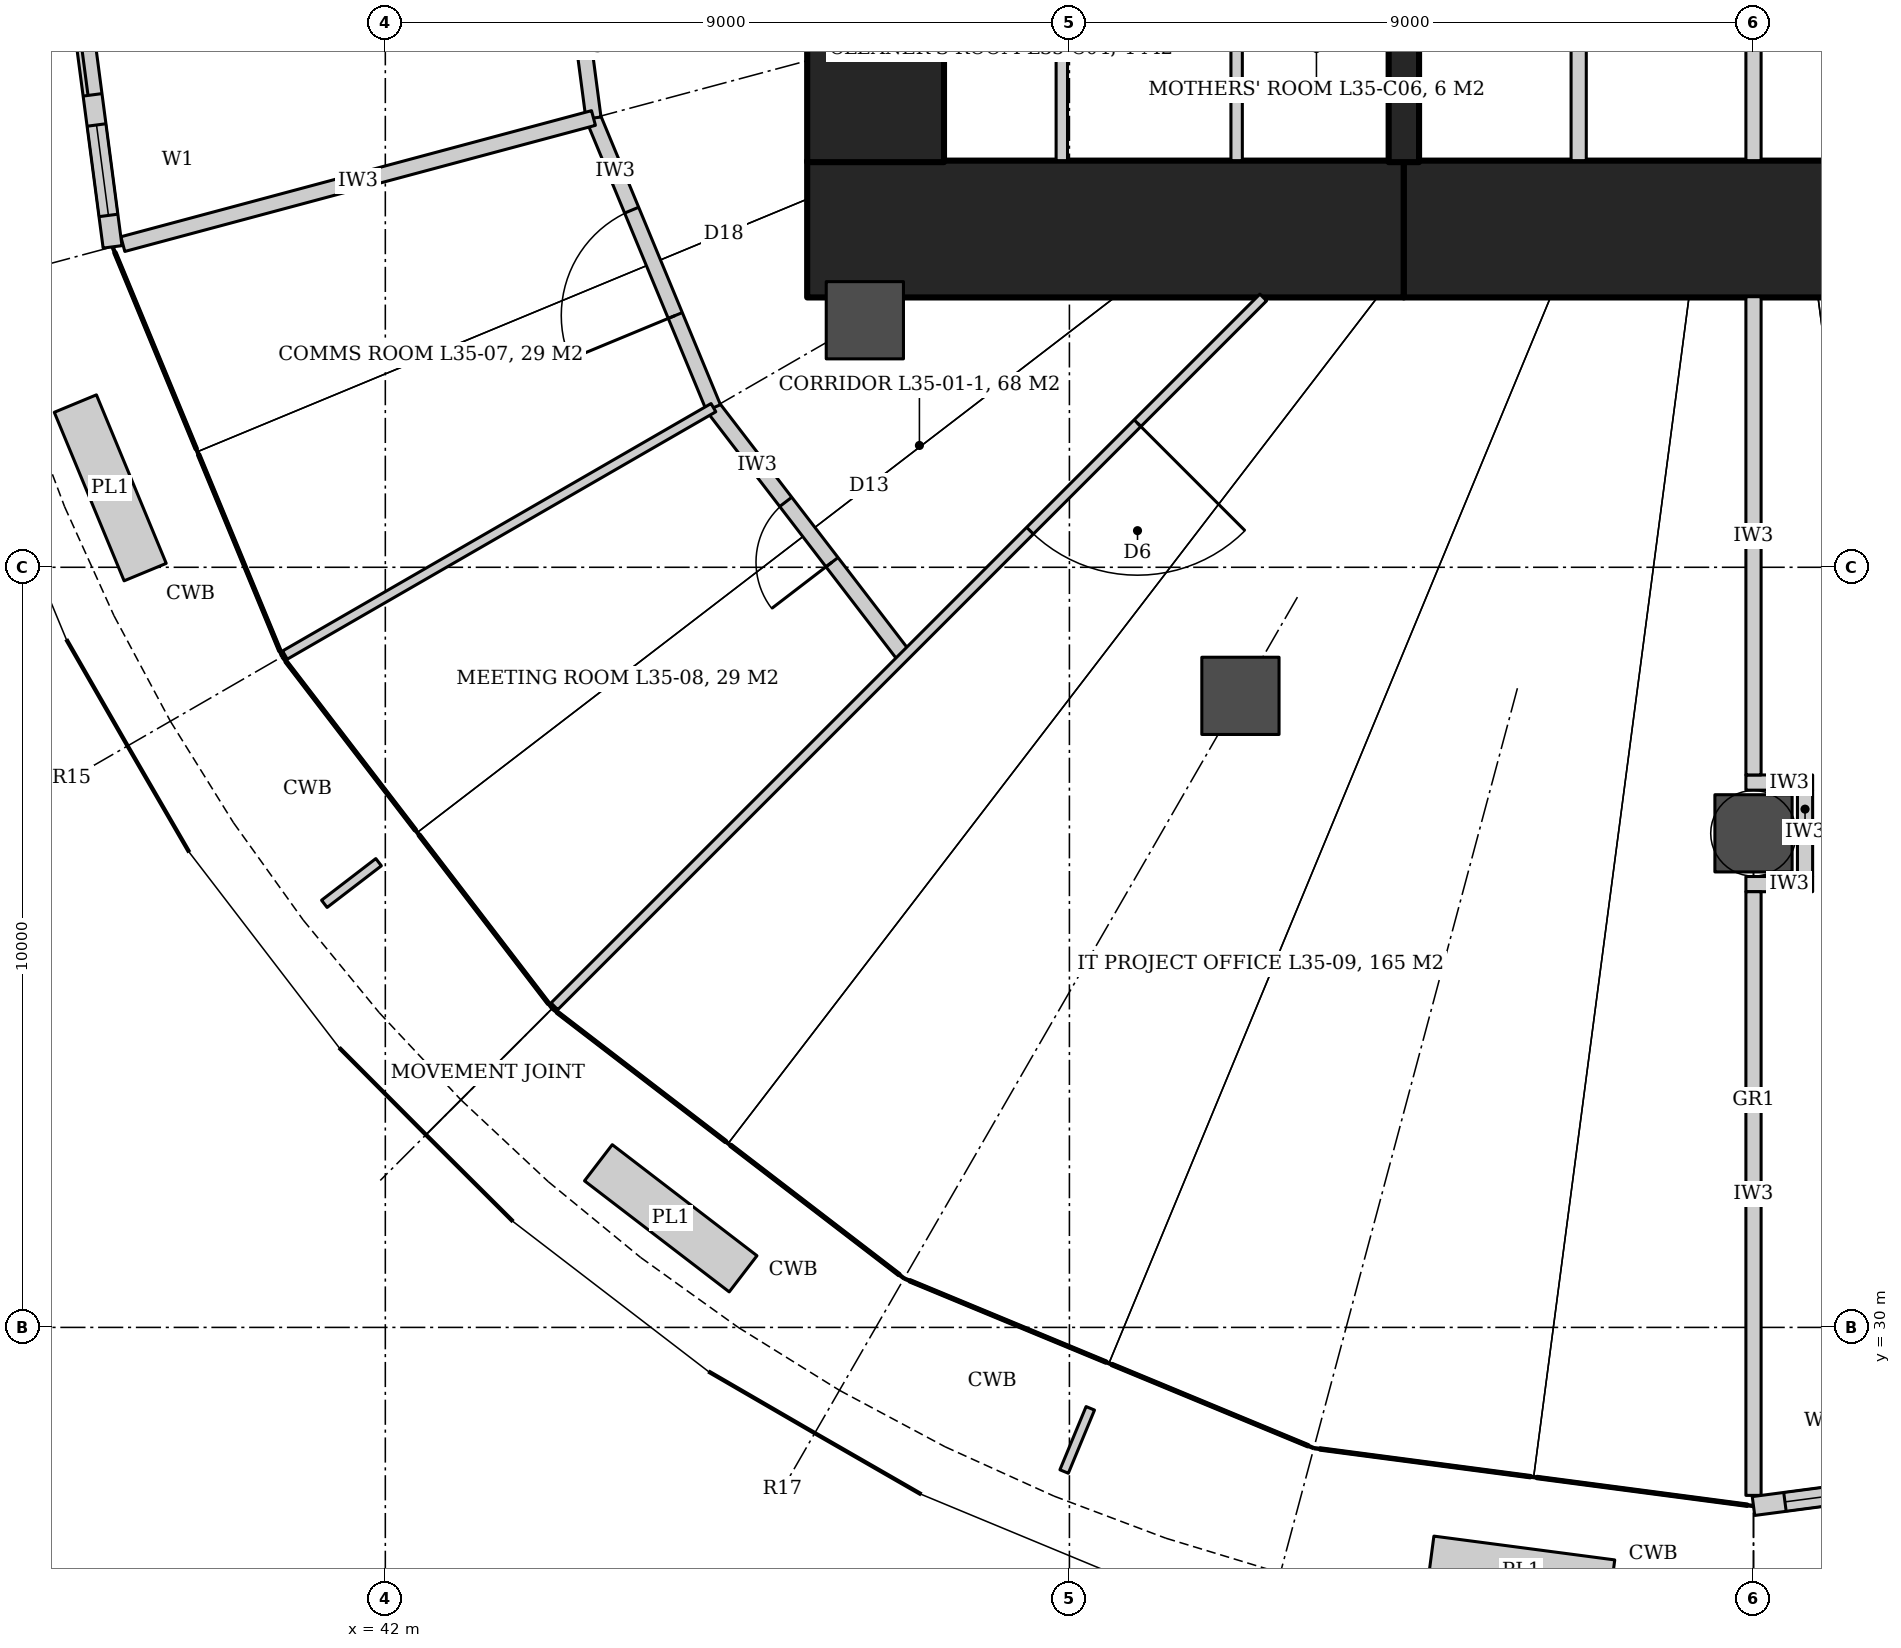
"""IFC4 building model, lengths in metres.
Left out: names, types, materials, properties, quantities, classifications, styles, units other than length and angle.
Written with IfcOpenShell. Run it as: python <this file> out.ifc"""

import sys

from ifc_helpers import new_model, si_unit, direction, frame, frame_2d, origin, origin_2d, place, context, subcontext, project, spatial, rectangle, hollow_circle, extrude, element, fill, save


model = new_model("IFC4")
c1 = context("Model", 3, precision=1e-05, world=origin(), true_north=direction((0.0, 1.0)))
c2 = subcontext(c1, "Body", "Model", "MODEL_VIEW")
j1 = project(units=[si_unit("LENGTHUNIT", "METRE"), si_unit("PLANEANGLEUNIT", "RADIAN")], contexts=[c1])
p1 = place(None, origin())
s1 = spatial("IfcSite", under=j1, at=p1, CompositionType="ELEMENT")
p2 = place(p1, origin())
s2 = spatial("IfcBuilding", under=s1, at=p2, CompositionType="ELEMENT")
p3 = place(p2, frame((0.0, 0.0, 147.8)))
s3 = spatial("IfcBuildingStorey", under=s2, at=p3, CompositionType="ELEMENT", Elevation=147.8)
p4 = place(p3, frame((47.55, 44.45, 0.0), z_axis=(0.0, 0.0, 1.0), x_axis=(1.0, 0.0, 0.0)))
e1 = element("IfcWall", 1, at=p4, inside=s3, PredefinedType="SHEAR", context=c2, shape_type="SweptSolid", body=[
    extrude(rectangle(XDim=7.85, YDim=1.8, at=frame_2d((3.925, 0.0))), origin(), (0.0, 0.0, 1.0), 4.2),
])
p5 = place(p3, frame((55.4, 44.45, 0.0), z_axis=(0.0, 0.0, 1.0), x_axis=(1.0, 0.0, 0.0)))
e2 = element("IfcWall", 2, at=p5, inside=s3, PredefinedType="SHEAR", context=c2, shape_type="SweptSolid", body=[
    extrude(rectangle(XDim=9.2, YDim=1.8, at=frame_2d((4.6, 0.0))), origin(), (0.0, 0.0, 1.0), 4.2),
])
p6 = place(p3, frame((48.45, 45.33, 0.0), z_axis=(0.0, 0.0, 1.0), x_axis=(0.0, 1.0, 0.0)))
e3 = element("IfcWall", 3, at=p6, inside=s3, PredefinedType="SHEAR", context=c2, shape_type="SweptSolid", body=[
    extrude(rectangle(XDim=3.17, YDim=1.8, at=frame_2d((1.585, 0.0))), origin(), (0.0, 0.0, 1.0), 4.2),
])
p7 = place(p3, frame((55.4, 48.32, 0.0), z_axis=(0.0, 0.0, 1.0), x_axis=(0.0, -1.0, 0.0)))
e4 = element("IfcWall", 4, at=p7, inside=s3, PredefinedType="SHEAR", context=c2, shape_type="SweptSolid", body=[
    extrude(rectangle(XDim=2.99, YDim=0.4, at=frame_2d((1.495, 0.0))), origin(), (0.0, 0.0, 1.0), 4.2),
])
for number, where, z_axis, x_axis in (
    (5, (48.309, 43.25, 0.0), (0.0, 0.0, 1.0), (1.0, 0.0, 0.0)),
    (6, (53.25, 38.309, 0.0), (0.0, 0.0, 1.0), (1.0, 0.0, 0.0)),
    (7, (60.0, 36.5, 0.0), (0.0, 0.0, 1.0), (1.0, 0.0, 0.0)),
):
    element("IfcColumn", number, at=place(p3, frame(where, z_axis=z_axis, x_axis=x_axis)), inside=s3, PredefinedType="COLUMN", context=c2, shape_type="SweptSolid", body=[
        extrude(hollow_circle(Radius=0.508, WallThickness=0.05, at=origin_2d()), origin(), (0.0, 0.0, 1.0), 4.2),
    ])
p8 = place(p3, frame((48.828, 38.828, 0.0), z_axis=(0.0, 0.0, 1.0), x_axis=(-0.608714823874, 0.793389099494, 0.0)))
e8 = element("IfcWall", 8, at=p8, inside=s3, PredefinedType="PARTITIONING", context=c2, shape_type="SweptSolid", body=[
    extrude(rectangle(XDim=4.125, YDim=0.2, at=frame_2d((2.062, 0.0))), origin(), (0.0, 0.0, 1.0), 3.04),
])
p9 = place(p8, frame((1.562, 0.0, 0.0)))
e9 = element("IfcOpeningElement", 9, at=p9, cuts=e8, PredefinedType="OPENING", context=c2, shape_type="SweptSolid", body=[
    extrude(rectangle(XDim=1.0, YDim=2.4, at=frame_2d((0.5, 1.2))), frame((0.0, 0.11, 0.0), z_axis=(0.0, -1.0, 0.0), x_axis=(1.0, 0.0, 0.0)), (0.0, 0.0, 1.0), 0.22),
])
p10 = place(p3, frame((46.317, 42.1, 0.0), z_axis=(0.0, 0.0, 1.0), x_axis=(-0.382731667114, 0.923859551549, 0.0)))
e10 = element("IfcWall", 10, at=p10, inside=s3, PredefinedType="PARTITIONING", context=c2, shape_type="SweptSolid", body=[
    extrude(rectangle(XDim=4.125, YDim=0.2, at=frame_2d((2.062, 0.0))), origin(), (0.0, 0.0, 1.0), 3.04),
])
p11 = place(p10, frame((1.312, 0.0, 0.0)))
e11 = element("IfcOpeningElement", 11, at=p11, cuts=e10, PredefinedType="OPENING", context=c2, shape_type="SweptSolid", body=[
    extrude(rectangle(XDim=1.5, YDim=2.1, at=frame_2d((0.75, 1.05))), frame((0.0, 0.11, 0.0), z_axis=(0.0, -1.0, 0.0), x_axis=(1.0, 0.0, 0.0)), (0.0, 0.0, 1.0), 0.22),
])
p12 = place(p3, frame((44.738, 45.911, 0.0), z_axis=(0.0, 0.0, 1.0), x_axis=(-0.130515758099, 0.991446234996, 0.0)))
e12 = element("IfcWall", 12, at=p12, inside=s3, PredefinedType="PARTITIONING", context=c2, shape_type="SweptSolid", body=[
    extrude(rectangle(XDim=4.125, YDim=0.2, at=frame_2d((2.062, 0.0))), origin(), (0.0, 0.0, 1.0), 3.04),
])
p13 = place(p12, frame((1.562, 0.0, 0.0)))
e13 = element("IfcOpeningElement", 13, at=p13, cuts=e12, PredefinedType="OPENING", context=c2, shape_type="SweptSolid", body=[
    extrude(rectangle(XDim=1.0, YDim=2.1, at=frame_2d((0.5, 1.05))), frame((0.0, 0.11, 0.0), z_axis=(0.0, -1.0, 0.0), x_axis=(1.0, 0.0, 0.0)), (0.0, 0.0, 1.0), 0.22),
])
p14 = place(p3, frame((44.738, 45.911, 0.0), z_axis=(0.0, 0.0, 1.0), x_axis=(-0.965919257384, -0.258843559344, 0.0)))
e14 = element("IfcWall", 14, at=p14, inside=s3, PredefinedType="PARTITIONING", context=c2, shape_type="SweptSolid", body=[
    extrude(rectangle(XDim=6.51, YDim=0.2, at=frame_2d((3.255, 0.0))), origin(), (0.0, 0.0, 1.0), 3.04),
])
p15 = place(p3, frame((46.317, 42.1, 0.0), z_axis=(0.0, 0.0, 1.0), x_axis=(-0.866020751647, -0.500008057651, 0.0)))
e15 = element("IfcWall", 15, at=p15, inside=s3, PredefinedType="PARTITIONING", context=c2, shape_type="SweptSolid", body=[
    extrude(rectangle(XDim=6.61, YDim=0.125, at=frame_2d((3.305, 0.0))), origin(), (0.0, 0.0, 1.0), 3.04),
])
p16 = place(p3, frame((53.55, 43.55, 0.0), z_axis=(0.0, 0.0, 1.0), x_axis=(-0.707106781187, -0.707106781187, 0.0)))
e16 = element("IfcWall", 16, at=p16, inside=s3, PredefinedType="PARTITIONING", context=c2, shape_type="SweptSolid", body=[
    extrude(rectangle(XDim=13.288, YDim=0.125, at=frame_2d((6.644, 0.0))), origin(), (0.0, 0.0, 1.0), 3.02),
])
p17 = place(p16, frame((2.339, 0.0, 0.0)))
e17 = element("IfcOpeningElement", 17, at=p17, cuts=e16, PredefinedType="OPENING", context=c2, shape_type="SweptSolid", body=[
    extrude(rectangle(XDim=2.0, YDim=2.1, at=frame_2d((1.0, 1.05))), frame((0.0, 0.073, 0.0), z_axis=(0.0, -1.0, 0.0), x_axis=(1.0, 0.0, 0.0)), (0.0, 0.0, 1.0), 0.145),
])
for number, where, z_axis, x_axis in (
    (18, (59.9, 37.168, 0.0), (0.0, 0.0, 1.0), (1.0, 0.0, 0.0)),
    (19, (59.9, 35.832, 0.0), (0.0, 0.0, 1.0), (1.0, 0.0, 0.0)),
):
    element("IfcWall", number, at=place(p3, frame(where, z_axis=z_axis, x_axis=x_axis)), inside=s3, PredefinedType="PARTITIONING", context=c2, shape_type="SweptSolid", body=[
        extrude(rectangle(XDim=0.878, YDim=0.2, at=frame_2d((0.439, 0.0))), origin(), (0.0, 0.0, 1.0), 3.02),
    ])
p18 = place(p3, frame((60.678, 37.068, 0.0), z_axis=(0.0, 0.0, 1.0), x_axis=(0.0, -1.0, 0.0)))
e20 = element("IfcWall", 20, at=p18, inside=s3, PredefinedType="PARTITIONING", context=c2, shape_type="SweptSolid", body=[
    extrude(rectangle(XDim=1.136, YDim=0.2, at=frame_2d((0.568, 0.0))), origin(), (0.0, 0.0, 1.0), 3.02),
])
p19 = place(p3, frame((60.0, 43.56, 0.0), z_axis=(0.0, 0.0, 1.0), x_axis=(0.0, -1.0, 0.0)))
e21 = element("IfcWall", 21, at=p19, inside=s3, PredefinedType="PARTITIONING", context=c2, shape_type="SweptSolid", body=[
    extrude(rectangle(XDim=6.292, YDim=0.2, at=frame_2d((3.146, 0.0))), origin(), (0.0, 0.0, 1.0), 3.04),
])
p20 = place(p3, frame((60.0, 35.732, 0.0), z_axis=(0.0, 0.0, 1.0), x_axis=(0.0, -1.0, 0.0)))
e22 = element("IfcWall", 22, at=p20, inside=s3, PredefinedType="PARTITIONING", context=c2, shape_type="SweptSolid", body=[
    extrude(rectangle(XDim=8.042, YDim=0.2, at=frame_2d((4.021, 0.0))), origin(), (0.0, 0.0, 1.0), 3.04),
])
p21 = place(p3, frame((37.55, 50.0, 0.0), z_axis=(0.0, 0.0, 1.0), x_axis=(0.130512702292, -0.991446637263, 0.0)))
e23 = element("IfcWall", 23, at=p21, inside=s3, PredefinedType="SOLIDWALL", context=c2, shape_type="SweptSolid", body=[
    extrude(rectangle(XDim=5.861, YDim=0.25, at=frame_2d((2.93, 0.0))), origin(), (0.0, 0.0, 1.0), 4.04),
])
p22 = place(p21, frame((2.03, 0.0, 0.0)))
e24 = element("IfcOpeningElement", 24, at=p22, cuts=e23, PredefinedType="OPENING", context=c2, shape_type="SweptSolid", body=[
    extrude(rectangle(XDim=1.8, YDim=2.4, at=frame_2d((0.9, 1.2))), frame((0.0, 0.135, 0.0), z_axis=(0.0, -1.0, 0.0), x_axis=(1.0, 0.0, 0.0)), (0.0, 0.0, 1.0), 0.27),
])
p23 = place(p21, frame((0.43, 0.0, 0.0)))
e25 = element("IfcOpeningElement", 25, at=p23, cuts=e23, PredefinedType="OPENING", context=c2, shape_type="SweptSolid", body=[
    extrude(rectangle(XDim=1.2, YDim=2.4, at=frame_2d((0.6, 1.2))), frame((0.0, 0.135, 0.0), z_axis=(0.0, -1.0, 0.0), x_axis=(1.0, 0.0, 0.0)), (0.0, 0.0, 1.0), 0.27),
])
p24 = place(p21, frame((4.23, 0.0, 0.0)))
e26 = element("IfcOpeningElement", 26, at=p24, cuts=e23, PredefinedType="OPENING", context=c2, shape_type="SweptSolid", body=[
    extrude(rectangle(XDim=1.2, YDim=2.4, at=frame_2d((0.6, 1.2))), frame((0.0, 0.135, 0.0), z_axis=(0.0, -1.0, 0.0), x_axis=(1.0, 0.0, 0.0)), (0.0, 0.0, 1.0), 0.27),
])
p25 = place(p3, frame((60.0, 27.55, 0.0), z_axis=(0.0, 0.0, 1.0), x_axis=(0.991446637263, 0.130512702292, 0.0)))
e27 = element("IfcWall", 27, at=p25, inside=s3, PredefinedType="SOLIDWALL", context=c2, shape_type="SweptSolid", body=[
    extrude(rectangle(XDim=5.861, YDim=0.25, at=frame_2d((2.93, 0.0))), origin(), (0.0, 0.0, 1.0), 4.04),
])
p26 = place(p25, frame((2.03, 0.0, 0.0)))
e28 = element("IfcOpeningElement", 28, at=p26, cuts=e27, PredefinedType="OPENING", context=c2, shape_type="SweptSolid", body=[
    extrude(rectangle(XDim=1.8, YDim=2.4, at=frame_2d((0.9, 1.2))), frame((0.0, 0.135, 0.0), z_axis=(0.0, -1.0, 0.0), x_axis=(1.0, 0.0, 0.0)), (0.0, 0.0, 1.0), 0.27),
])
p27 = place(p25, frame((0.43, 0.0, 0.0)))
e29 = element("IfcOpeningElement", 29, at=p27, cuts=e27, PredefinedType="OPENING", context=c2, shape_type="SweptSolid", body=[
    extrude(rectangle(XDim=1.2, YDim=2.4, at=frame_2d((0.6, 1.2))), frame((0.0, 0.135, 0.0), z_axis=(0.0, -1.0, 0.0), x_axis=(1.0, 0.0, 0.0)), (0.0, 0.0, 1.0), 0.27),
])
p28 = place(p25, frame((4.23, 0.0, 0.0)))
e30 = element("IfcOpeningElement", 30, at=p28, cuts=e27, PredefinedType="OPENING", context=c2, shape_type="SweptSolid", body=[
    extrude(rectangle(XDim=1.2, YDim=2.4, at=frame_2d((0.6, 1.2))), frame((0.0, 0.135, 0.0), z_axis=(0.0, -1.0, 0.0), x_axis=(1.0, 0.0, 0.0)), (0.0, 0.0, 1.0), 0.27),
])
for number, where, z_axis, x_axis in (
    (31, (57.7, 45.35, 0.0), (0.0, 0.0, 1.0), (0.0, 1.0, 0.0)),
    (32, (60.0, 45.35, 0.0), (0.0, 0.0, 1.0), (0.0, 1.0, 0.0)),
):
    element("IfcWall", number, at=place(p3, frame(where, z_axis=z_axis, x_axis=x_axis)), inside=s3, PredefinedType="PARTITIONING", context=c2, shape_type="SweptSolid", body=[
        extrude(rectangle(XDim=2.95, YDim=0.2, at=frame_2d((1.475, 0.0))), origin(), (0.0, 0.0, 1.0), 4.2),
    ])
for number, where, z_axis, x_axis in (
    (33, (50.9, 45.35, 0.0), (0.0, 0.0, 1.0), (0.0, 1.0, 0.0)),
    (34, (53.2, 45.35, 0.0), (0.0, 0.0, 1.0), (0.0, 1.0, 0.0)),
):
    element("IfcWall", number, at=place(p3, frame(where, z_axis=z_axis, x_axis=x_axis)), inside=s3, PredefinedType="PARTITIONING", context=c2, shape_type="SweptSolid", body=[
        extrude(rectangle(XDim=2.95, YDim=0.15, at=frame_2d((1.475, 0.0))), origin(), (0.0, 0.0, 1.0), 4.04),
    ])
p29 = place(p11, origin())
e35 = element("IfcDoor", 35, at=p29, inside=s3, OperationType="DOUBLE_DOOR_DOUBLE_SWING", PredefinedType="DOOR", context=c2, shape_type="SweptSolid", body=[
    extrude(rectangle(XDim=1.5, YDim=2.1, at=frame_2d((0.75, 1.05))), frame((0.0, 0.025, 0.0), z_axis=(0.0, -1.0, 0.0), x_axis=(1.0, 0.0, 0.0)), (0.0, 0.0, 1.0), 0.05),
])
fill(e11, e35)
p30 = place(p9, origin())
e36 = element("IfcDoor", 36, at=p30, inside=s3, OperationType="SINGLE_SWING_LEFT", PredefinedType="DOOR", context=c2, shape_type="SweptSolid", body=[
    extrude(rectangle(XDim=1.0, YDim=2.4, at=frame_2d((0.5, 1.2))), frame((0.0, 0.025, 0.0), z_axis=(0.0, -1.0, 0.0), x_axis=(1.0, 0.0, 0.0)), (0.0, 0.0, 1.0), 0.05),
])
fill(e9, e36)
p31 = place(p17, origin())
e37 = element("IfcDoor", 37, at=p31, inside=s3, OperationType="DOUBLE_DOOR_DOUBLE_SWING", PredefinedType="DOOR", context=c2, shape_type="SweptSolid", body=[
    extrude(rectangle(XDim=2.0, YDim=2.1, at=frame_2d((1.0, 1.05))), frame((0.0, 0.025, 0.0), z_axis=(0.0, -1.0, 0.0), x_axis=(1.0, 0.0, 0.0)), (0.0, 0.0, 1.0), 0.05),
])
fill(e17, e37)
p32 = place(p22, origin())
e38 = element("IfcDoor", 38, at=p32, inside=s3, OperationType="DOUBLE_DOOR_SLIDING", PredefinedType="DOOR", context=c2, shape_type="SweptSolid", body=[
    extrude(rectangle(XDim=1.8, YDim=2.4, at=frame_2d((0.9, 1.2))), frame((0.0, 0.025, 0.0), z_axis=(0.0, -1.0, 0.0), x_axis=(1.0, 0.0, 0.0)), (0.0, 0.0, 1.0), 0.05),
])
fill(e24, e38)
p33 = place(p24, origin())
e39 = element("IfcWindow", 39, at=p33, inside=s3, PartitioningType="SINGLE_PANEL", PredefinedType="WINDOW", context=c2, shape_type="SweptSolid", body=[
    extrude(rectangle(XDim=1.2, YDim=2.4, at=frame_2d((0.6, 1.2))), frame((0.0, 0.03, 0.0), z_axis=(0.0, -1.0, 0.0), x_axis=(1.0, 0.0, 0.0)), (0.0, 0.0, 1.0), 0.06),
])
fill(e26, e39)
p34 = place(p27, origin())
e40 = element("IfcWindow", 40, at=p34, inside=s3, PartitioningType="SINGLE_PANEL", PredefinedType="WINDOW", context=c2, shape_type="SweptSolid", body=[
    extrude(rectangle(XDim=1.2, YDim=2.4, at=frame_2d((0.6, 1.2))), frame((0.0, 0.03, 0.0), z_axis=(0.0, -1.0, 0.0), x_axis=(1.0, 0.0, 0.0)), (0.0, 0.0, 1.0), 0.06),
])
fill(e29, e40)
save(model, sys.argv[1])
